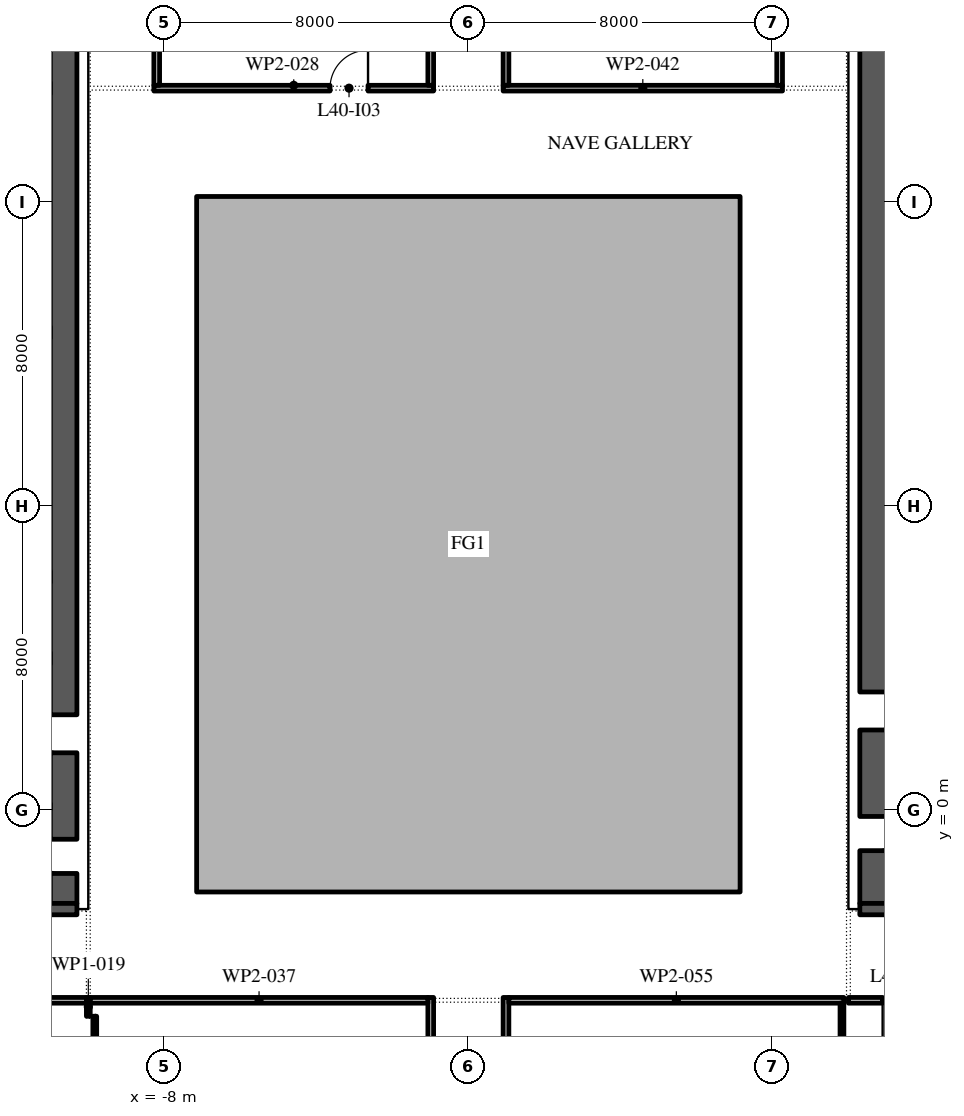
"""IFC4 building model, lengths in metres.
Left out: names, types, materials, properties, quantities, classifications, styles, units other than length and angle.
Written with IfcOpenShell. Run it as: python <this file> out.ifc"""

import sys

from ifc_helpers import new_model, si_unit, direction, frame, frame_2d, origin, place, context, subcontext, project, spatial, polyline, rectangle, outline, extrude, element, fill, save


model = new_model("IFC4")
c1 = context("Model", 3, precision=1e-05, world=origin(), true_north=direction((0.0, 1.0)))
c2 = subcontext(c1, "Body", "Model", "MODEL_VIEW")
j1 = project(units=[si_unit("LENGTHUNIT", "METRE"), si_unit("PLANEANGLEUNIT", "RADIAN")], contexts=[c1])
p1 = place(None, origin())
s1 = spatial("IfcSite", under=j1, at=p1, CompositionType="ELEMENT")
p2 = place(p1, origin())
s2 = spatial("IfcBuilding", under=s1, at=p2, CompositionType="ELEMENT")
p3 = place(p2, frame((0.0, 0.0, 184.2)))
s3 = spatial("IfcBuildingStorey", under=s2, at=p3, CompositionType="ELEMENT", Elevation=184.2)
p4 = place(p3, origin())
e1 = element("IfcWall", 1, at=p4, inside=s3, PredefinedType="STANDARD", context=c2, shape_type="SweptSolid", body=[
    extrude(outline(polyline([(-7.15, -2.15), (7.15, -2.15), (7.15, 16.15), (-7.15, 16.15), (-7.15, -2.15)]), holes=[polyline([(-7.0, -2.0), (-7.0, 16.0), (7.0, 16.0), (7.0, -2.0), (-7.0, -2.0)])]), origin(), (0.0, 0.0, 1.0), 4.0),
])
p5 = place(p3, frame((-10.65, -2.45, 0.0), z_axis=(0.0, 0.0, 1.0), x_axis=(0.0, 1.0, 0.0)))
e2 = element("IfcWall", 2, at=p5, inside=s3, PredefinedType="SHEAR", context=c2, shape_type="SweptSolid", body=[
    extrude(rectangle(XDim=27.9, YDim=0.7, at=frame_2d((13.95, 0.0))), origin(), (0.0, 0.0, 1.0), 4.0),
])
p6 = place(p5, frame((23.65, 0.0, 0.0)))
e3 = element("IfcOpeningElement", 3, at=p6, cuts=e2, PredefinedType="OPENING", context=c2, shape_type="SweptSolid", body=[
    extrude(rectangle(XDim=2.4, YDim=2.1, at=frame_2d((1.2, 1.05))), frame((0.0, 0.36, 0.0), z_axis=(0.0, -1.0, 0.0), x_axis=(1.0, 0.0, 0.0)), (0.0, 0.0, 1.0), 0.72),
])
p7 = place(p5, frame((0.788, 0.0, 0.0)))
e4 = element("IfcOpeningElement", 4, at=p7, cuts=e2, PredefinedType="OPENING", context=c2, shape_type="SweptSolid", body=[
    extrude(rectangle(XDim=0.9, YDim=2.1, at=frame_2d((0.45, 1.05))), frame((0.0, 0.36, 0.0), z_axis=(0.0, -1.0, 0.0), x_axis=(1.0, 0.0, 0.0)), (0.0, 0.0, 1.0), 0.72),
])
p8 = place(p5, frame((3.962, 0.0, 0.0)))
e5 = element("IfcOpeningElement", 5, at=p8, cuts=e2, PredefinedType="OPENING", context=c2, shape_type="SweptSolid", body=[
    extrude(rectangle(XDim=1.0, YDim=2.1, at=frame_2d((0.5, 1.05))), frame((0.0, 0.36, 0.0), z_axis=(0.0, -1.0, 0.0), x_axis=(1.0, 0.0, 0.0)), (0.0, 0.0, 1.0), 0.72),
])
p9 = place(p3, frame((-21.7, -2.6, 0.0), z_axis=(0.0, 0.0, 1.0), x_axis=(1.0, 0.0, 0.0)))
e6 = element("IfcWall", 6, at=p9, inside=s3, PredefinedType="SHEAR", context=c2, shape_type="SweptSolid", body=[
    extrude(rectangle(XDim=11.4, YDim=0.3, at=frame_2d((5.7, 0.0))), origin(), (0.0, 0.0, 1.0), 4.0),
])
p10 = place(p3, frame((10.65, -2.45, 0.0), z_axis=(0.0, 0.0, 1.0), x_axis=(0.0, 1.0, 0.0)))
e7 = element("IfcWall", 7, at=p10, inside=s3, PredefinedType="SHEAR", context=c2, shape_type="SweptSolid", body=[
    extrude(rectangle(XDim=27.9, YDim=0.7, at=frame_2d((13.95, 0.0))), origin(), (0.0, 0.0, 1.0), 4.0),
])
p11 = place(p10, frame((23.65, 0.0, 0.0)))
e8 = element("IfcOpeningElement", 8, at=p11, cuts=e7, PredefinedType="OPENING", context=c2, shape_type="SweptSolid", body=[
    extrude(rectangle(XDim=2.4, YDim=2.1, at=frame_2d((1.2, 1.05))), frame((0.0, 0.36, 0.0), z_axis=(0.0, -1.0, 0.0), x_axis=(1.0, 0.0, 0.0)), (0.0, 0.0, 1.0), 0.72),
])
p12 = place(p10, frame((1.387, 0.0, 0.0)))
e9 = element("IfcOpeningElement", 9, at=p12, cuts=e7, PredefinedType="OPENING", context=c2, shape_type="SweptSolid", body=[
    extrude(rectangle(XDim=0.9, YDim=2.1, at=frame_2d((0.45, 1.05))), frame((0.0, 0.36, 0.0), z_axis=(0.0, -1.0, 0.0), x_axis=(1.0, 0.0, 0.0)), (0.0, 0.0, 1.0), 0.72),
])
p13 = place(p10, frame((4.562, 0.0, 0.0)))
e10 = element("IfcOpeningElement", 10, at=p13, cuts=e7, PredefinedType="OPENING", context=c2, shape_type="SweptSolid", body=[
    extrude(rectangle(XDim=1.0, YDim=2.1, at=frame_2d((0.5, 1.05))), frame((0.0, 0.36, 0.0), z_axis=(0.0, -1.0, 0.0), x_axis=(1.0, 0.0, 0.0)), (0.0, 0.0, 1.0), 0.72),
])
p14 = place(p3, frame((10.3, -2.6, 0.0), z_axis=(0.0, 0.0, 1.0), x_axis=(1.0, 0.0, 0.0)))
e11 = element("IfcWall", 11, at=p14, inside=s3, PredefinedType="SHEAR", context=c2, shape_type="SweptSolid", body=[
    extrude(rectangle(XDim=11.4, YDim=0.3, at=frame_2d((5.7, 0.0))), origin(), (0.0, 0.0, 1.0), 4.0),
])
p15 = place(p3, frame((-10.0, -5.42, 0.0), z_axis=(0.0, 0.0, 1.0), x_axis=(0.0, 1.0, 0.0)))
e12 = element("IfcWall", 12, at=p15, inside=s3, PredefinedType="PARTITIONING", context=c2, shape_type="SweptSolid", body=[
    extrude(rectangle(XDim=0.495, YDim=0.1, at=frame_2d((0.248, 0.0))), origin(), (0.0, 0.0, 1.0), 4.0),
])
p16 = place(p3, frame((-10.05, -5.0, 0.0), z_axis=(0.0, 0.0, 1.0), x_axis=(-1.0, 0.0, 0.0)))
e13 = element("IfcWall", 13, at=p16, inside=s3, PredefinedType="PARTITIONING", context=c2, shape_type="SweptSolid", body=[
    extrude(rectangle(XDim=13.665, YDim=0.15, at=frame_2d((6.833, 0.0))), origin(), (0.0, 0.0, 1.0), 4.0),
])
p17 = place(p16, frame((5.09, 0.0, 0.0)))
e14 = element("IfcOpeningElement", 14, at=p17, cuts=e13, PredefinedType="OPENING", context=c2, shape_type="SweptSolid", body=[
    extrude(rectangle(XDim=1.0, YDim=2.1, at=frame_2d((0.5, 1.05))), frame((0.0, 0.085, 0.0), z_axis=(0.0, -1.0, 0.0), x_axis=(1.0, 0.0, 0.0)), (0.0, 0.0, 1.0), 0.17),
])
p18 = place(p3, frame((-9.83, -11.12, 0.0), z_axis=(0.0, 0.0, 1.0), x_axis=(0.0, 1.0, 0.0)))
e15 = element("IfcWall", 15, at=p18, inside=s3, PredefinedType="PARTITIONING", context=c2, shape_type="SweptSolid", body=[
    extrude(rectangle(XDim=5.7, YDim=0.1, at=frame_2d((2.85, 0.0))), origin(), (0.0, 0.0, 1.0), 4.0),
])
p19 = place(p3, frame((-8.275, 19.0, 0.0), z_axis=(0.0, 0.0, 1.0), x_axis=(1.0, 0.0, 0.0)))
e16 = element("IfcWall", 16, at=p19, inside=s3, PredefinedType="PARTITIONING", context=c2, shape_type="SweptSolid", body=[
    extrude(rectangle(XDim=7.36, YDim=0.15, at=frame_2d((3.68, 0.0))), origin(), (0.0, 0.0, 1.0), 4.0),
])
p20 = place(p19, frame((4.635, 0.0, 0.0)))
e17 = element("IfcOpeningElement", 17, at=p20, cuts=e16, PredefinedType="OPENING", context=c2, shape_type="SweptSolid", body=[
    extrude(rectangle(XDim=1.0, YDim=2.1, at=frame_2d((0.5, 1.05))), frame((0.0, 0.085, 0.0), z_axis=(0.0, -1.0, 0.0), x_axis=(1.0, 0.0, 0.0)), (0.0, 0.0, 1.0), 0.17),
])
p21 = place(p3, frame((-8.2, 23.565, 0.0), z_axis=(0.0, 0.0, 1.0), x_axis=(0.0, -1.0, 0.0)))
e18 = element("IfcWall", 18, at=p21, inside=s3, PredefinedType="PARTITIONING", context=c2, shape_type="SweptSolid", body=[
    extrude(rectangle(XDim=4.49, YDim=0.15, at=frame_2d((2.245, 0.0))), origin(), (0.0, 0.0, 1.0), 4.0),
])
p22 = place(p3, frame((-0.99, -16.753, 0.0), z_axis=(0.0, 0.0, 1.0), x_axis=(0.0, 1.0, 0.0)))
e19 = element("IfcWall", 19, at=p22, inside=s3, PredefinedType="PARTITIONING", context=c2, shape_type="SweptSolid", body=[
    extrude(rectangle(XDim=11.828, YDim=0.15, at=frame_2d((5.914, 0.0))), origin(), (0.0, 0.0, 1.0), 4.0),
])
p23 = place(p22, frame((2.853, 0.0, 0.0)))
e20 = element("IfcOpeningElement", 20, at=p23, cuts=e19, PredefinedType="OPENING", context=c2, shape_type="SweptSolid", body=[
    extrude(rectangle(XDim=1.0, YDim=2.1, at=frame_2d((0.5, 1.05))), frame((0.0, 0.085, 0.0), z_axis=(0.0, -1.0, 0.0), x_axis=(1.0, 0.0, 0.0)), (0.0, 0.0, 1.0), 0.17),
])
p24 = place(p3, frame((-1.065, -5.0, 0.0), z_axis=(0.0, 0.0, 1.0), x_axis=(-1.0, 0.0, 0.0)))
e21 = element("IfcWall", 21, at=p24, inside=s3, PredefinedType="PARTITIONING", context=c2, shape_type="SweptSolid", body=[
    extrude(rectangle(XDim=8.885, YDim=0.15, at=frame_2d((4.442, 0.0))), origin(), (0.0, 0.0, 1.0), 4.0),
])
p25 = place(p3, frame((-0.99, 19.075, 0.0), z_axis=(0.0, 0.0, 1.0), x_axis=(0.0, 1.0, 0.0)))
e22 = element("IfcWall", 22, at=p25, inside=s3, PredefinedType="PARTITIONING", context=c2, shape_type="SweptSolid", body=[
    extrude(rectangle(XDim=4.365, YDim=0.15, at=frame_2d((2.183, 0.0))), origin(), (0.0, 0.0, 1.0), 4.0),
])
p26 = place(p3, frame((0.99, -4.925, 0.0), z_axis=(0.0, 0.0, 1.0), x_axis=(0.0, -1.0, 0.0)))
e23 = element("IfcWall", 23, at=p26, inside=s3, PredefinedType="PARTITIONING", context=c2, shape_type="SweptSolid", body=[
    extrude(rectangle(XDim=11.371, YDim=0.15, at=frame_2d((5.686, 0.0))), origin(), (0.0, 0.0, 1.0), 4.0),
])
p27 = place(p26, frame((2.945, 0.0, 0.0)))
e24 = element("IfcOpeningElement", 24, at=p27, cuts=e23, PredefinedType="OPENING", context=c2, shape_type="SweptSolid", body=[
    extrude(rectangle(XDim=1.0, YDim=2.1, at=frame_2d((0.5, 1.05))), frame((0.0, 0.085, 0.0), z_axis=(0.0, -1.0, 0.0), x_axis=(1.0, 0.0, 0.0)), (0.0, 0.0, 1.0), 0.17),
])
p28 = place(p3, frame((0.915, 19.0, 0.0), z_axis=(0.0, 0.0, 1.0), x_axis=(1.0, 0.0, 0.0)))
e25 = element("IfcWall", 25, at=p28, inside=s3, PredefinedType="PARTITIONING", context=c2, shape_type="SweptSolid", body=[
    extrude(rectangle(XDim=7.35, YDim=0.15, at=frame_2d((3.675, 0.0))), origin(), (0.0, 0.0, 1.0), 4.0),
])
p29 = place(p3, frame((0.99, 27.55, 0.0), z_axis=(0.0, 0.0, 1.0), x_axis=(0.0, -1.0, 0.0)))
e26 = element("IfcWall", 26, at=p29, inside=s3, PredefinedType="PARTITIONING", context=c2, shape_type="SweptSolid", body=[
    extrude(rectangle(XDim=8.475, YDim=0.15, at=frame_2d((4.238, 0.0))), origin(), (0.0, 0.0, 1.0), 4.0),
])
p30 = place(p29, frame((4.65, 0.0, 0.0)))
e27 = element("IfcOpeningElement", 27, at=p30, cuts=e26, PredefinedType="OPENING", context=c2, shape_type="SweptSolid", body=[
    extrude(rectangle(XDim=1.0, YDim=2.1, at=frame_2d((0.5, 1.05))), frame((0.0, 0.085, 0.0), z_axis=(0.0, -1.0, 0.0), x_axis=(1.0, 0.0, 0.0)), (0.0, 0.0, 1.0), 0.17),
])
p31 = place(p3, frame((8.19, 19.075, 0.0), z_axis=(0.0, 0.0, 1.0), x_axis=(0.0, 1.0, 0.0)))
e28 = element("IfcWall", 28, at=p31, inside=s3, PredefinedType="PARTITIONING", context=c2, shape_type="SweptSolid", body=[
    extrude(rectangle(XDim=8.065, YDim=0.15, at=frame_2d((4.032, 0.0))), origin(), (0.0, 0.0, 1.0), 4.0),
])
p32 = place(p3, frame((9.88, -5.0, 0.0), z_axis=(0.0, 0.0, 1.0), x_axis=(-1.0, 0.0, 0.0)))
e29 = element("IfcWall", 29, at=p32, inside=s3, PredefinedType="PARTITIONING", context=c2, shape_type="SweptSolid", body=[
    extrude(rectangle(XDim=8.815, YDim=0.15, at=frame_2d((4.407, 0.0))), origin(), (0.0, 0.0, 1.0), 4.0),
])
p33 = place(p3, frame((9.83, -5.075, 0.0), z_axis=(0.0, 0.0, 1.0), x_axis=(0.0, -1.0, 0.0)))
e30 = element("IfcWall", 30, at=p33, inside=s3, PredefinedType="PARTITIONING", context=c2, shape_type="SweptSolid", body=[
    extrude(rectangle(XDim=9.18, YDim=0.1, at=frame_2d((4.59, 0.0))), origin(), (0.0, 0.0, 1.0), 4.0),
])
p34 = place(p3, frame((14.43, -5.0, 0.0), z_axis=(0.0, 0.0, 1.0), x_axis=(-1.0, 0.0, 0.0)))
e31 = element("IfcWall", 31, at=p34, inside=s3, PredefinedType="PARTITIONING", context=c2, shape_type="SweptSolid", body=[
    extrude(rectangle(XDim=4.43, YDim=0.15, at=frame_2d((2.215, 0.0))), origin(), (0.0, 0.0, 1.0), 4.0),
])
p35 = place(p34, frame((2.53, 0.0, 0.0)))
e32 = element("IfcOpeningElement", 32, at=p35, cuts=e31, PredefinedType="OPENING", context=c2, shape_type="SweptSolid", body=[
    extrude(rectangle(XDim=1.0, YDim=2.1, at=frame_2d((0.5, 1.05))), frame((0.0, 0.085, 0.0), z_axis=(0.0, -1.0, 0.0), x_axis=(1.0, 0.0, 0.0)), (0.0, 0.0, 1.0), 0.17),
])
p36 = place(p20, origin())
e33 = element("IfcDoor", 33, at=p36, inside=s3, OperationType="SINGLE_SWING_LEFT", PredefinedType="DOOR", context=c2, shape_type="SweptSolid", body=[
    extrude(rectangle(XDim=1.0, YDim=2.1, at=frame_2d((0.5, 1.05))), frame((0.0, 0.025, 0.0), z_axis=(0.0, -1.0, 0.0), x_axis=(1.0, 0.0, 0.0)), (0.0, 0.0, 1.0), 0.05),
])
fill(e17, e33)
p37 = place(p35, origin())
e34 = element("IfcDoor", 34, at=p37, inside=s3, OperationType="SINGLE_SWING_LEFT", PredefinedType="DOOR", context=c2, shape_type="SweptSolid", body=[
    extrude(rectangle(XDim=1.0, YDim=2.1, at=frame_2d((0.5, 1.05))), frame((0.0, 0.025, 0.0), z_axis=(0.0, -1.0, 0.0), x_axis=(1.0, 0.0, 0.0)), (0.0, 0.0, 1.0), 0.05),
])
fill(e32, e34)
save(model, sys.argv[1])
